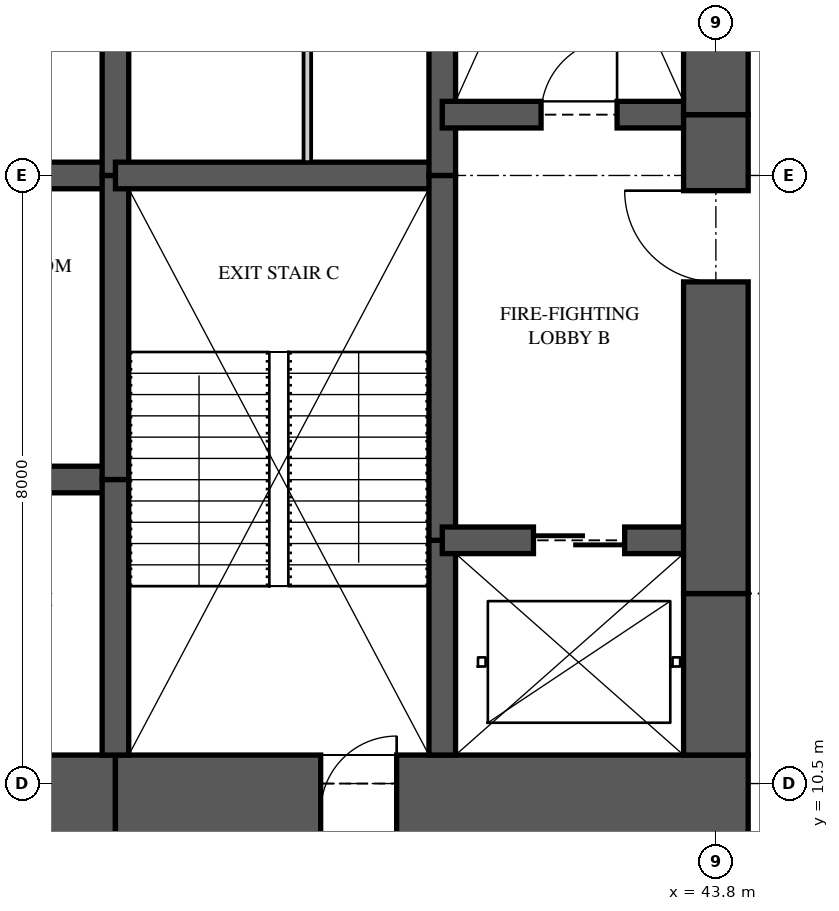
"""IFC4 building model, lengths in metres.
Left out: names, types, materials, properties, quantities, classifications, styles, units other than length and angle.
Written with IfcOpenShell. Run it as: python <this file> out.ifc"""

import sys

from ifc_helpers import new_model, si_unit, direction, frame, frame_2d, origin, place, context, subcontext, project, spatial, rectangle, extrude, element, fill, save


model = new_model("IFC4")
c1 = context("Model", 3, precision=1e-05, world=origin(), true_north=direction((0.0, 1.0)))
c2 = subcontext(c1, "Body", "Model", "MODEL_VIEW")
j1 = project(units=[si_unit("LENGTHUNIT", "METRE"), si_unit("PLANEANGLEUNIT", "RADIAN")], contexts=[c1])
p1 = place(None, origin())
s1 = spatial("IfcSite", under=j1, at=p1, CompositionType="ELEMENT")
p2 = place(p1, origin())
s2 = spatial("IfcBuilding", under=s1, at=p2, CompositionType="ELEMENT")
p3 = place(p2, frame((0.0, 0.0, 118.25)))
s3 = spatial("IfcBuildingStorey", under=s2, at=p3, CompositionType="ELEMENT", Elevation=118.25)
p4 = place(p3, frame((31.6, 10.125, 0.0), z_axis=(0.0, 0.0, 1.0), x_axis=(1.0, 0.0, 0.0)))
e1 = element("IfcWall", 1, at=p4, inside=s3, PredefinedType="SHEAR", context=c2, shape_type="SweptSolid", body=[
    extrude(rectangle(XDim=4.3, YDim=1.5, at=frame_2d((2.15, 0.0))), origin(), (0.0, 0.0, 1.0), 3.35),
])
p5 = place(p3, frame((35.9, 10.125, 0.0), z_axis=(0.0, 0.0, 1.0), x_axis=(1.0, 0.0, 0.0)))
e2 = element("IfcWall", 2, at=p5, inside=s3, PredefinedType="SHEAR", context=c2, shape_type="SweptSolid", body=[
    extrude(rectangle(XDim=8.325, YDim=1.5, at=frame_2d((4.163, 0.0))), origin(), (0.0, 0.0, 1.0), 3.35),
])
p6 = place(p5, frame((2.7, 0.0, 0.0)))
e3 = element("IfcOpeningElement", 3, at=p6, cuts=e2, PredefinedType="OPENING", context=c2, shape_type="SweptSolid", body=[
    extrude(rectangle(XDim=1.0, YDim=2.1, at=frame_2d((0.5, 1.05))), frame((0.0, 0.76, 0.0), z_axis=(0.0, -1.0, 0.0), x_axis=(1.0, 0.0, 0.0)), (0.0, 0.0, 1.0), 1.52),
])
p7 = place(p3, frame((43.8, 10.875, 0.0), z_axis=(0.0, 0.0, 1.0), x_axis=(0.0, 1.0, 0.0)))
e4 = element("IfcWall", 4, at=p7, inside=s3, PredefinedType="SHEAR", context=c2, shape_type="SweptSolid", body=[
    extrude(rectangle(XDim=2.125, YDim=0.85, at=frame_2d((1.062, 0.0))), origin(), (0.0, 0.0, 1.0), 3.35),
])
p8 = place(p3, frame((43.8, 13.0, 0.0), z_axis=(0.0, 0.0, 1.0), x_axis=(0.0, 1.0, 0.0)))
e5 = element("IfcWall", 5, at=p8, inside=s3, PredefinedType="SHEAR", context=c2, shape_type="SweptSolid", body=[
    extrude(rectangle(XDim=6.3, YDim=0.85, at=frame_2d((3.15, 0.0))), origin(), (0.0, 0.0, 1.0), 3.35),
])
p9 = place(p8, frame((4.1, 0.0, 0.0)))
e6 = element("IfcOpeningElement", 6, at=p9, cuts=e5, PredefinedType="OPENING", context=c2, shape_type="SweptSolid", body=[
    extrude(rectangle(XDim=1.2, YDim=2.2, at=frame_2d((0.6, 1.1))), frame((0.0, 0.435, 0.0), z_axis=(0.0, -1.0, 0.0), x_axis=(1.0, 0.0, 0.0)), (0.0, 0.0, 1.0), 0.87),
])
p10 = place(p3, frame((43.8, 19.3, 0.0), z_axis=(0.0, 0.0, 1.0), x_axis=(0.0, 1.0, 0.0)))
e7 = element("IfcWall", 7, at=p10, inside=s3, PredefinedType="SHEAR", context=c2, shape_type="SweptSolid", body=[
    extrude(rectangle(XDim=6.825, YDim=0.85, at=frame_2d((3.413, 0.0))), origin(), (0.0, 0.0, 1.0), 3.35),
])
p11 = place(p3, frame((35.9, 10.875, 0.0), z_axis=(0.0, 0.0, 1.0), x_axis=(0.0, 1.0, 0.0)))
e8 = element("IfcWall", 8, at=p11, inside=s3, PredefinedType="SHEAR", context=c2, shape_type="SweptSolid", body=[
    extrude(rectangle(XDim=3.625, YDim=0.35, at=frame_2d((1.812, 0.0))), origin(), (0.0, 0.0, 1.0), 3.35),
])
for number, where, z_axis, x_axis in (
    (9, (35.9, 14.5, 0.0), (0.0, 0.0, 1.0), (0.0, 1.0, 0.0)),
    (10, (35.9, 18.5, 0.0), (0.0, 0.0, 1.0), (0.0, 1.0, 0.0)),
):
    element("IfcWall", number, at=place(p3, frame(where, z_axis=z_axis, x_axis=x_axis)), inside=s3, PredefinedType="SHEAR", context=c2, shape_type="SweptSolid", body=[
        extrude(rectangle(XDim=4.0, YDim=0.35, at=frame_2d((2.0, 0.0))), origin(), (0.0, 0.0, 1.0), 3.35),
    ])
p12 = place(p3, frame((40.2, 10.875, 0.0), z_axis=(0.0, 0.0, 1.0), x_axis=(0.0, 1.0, 0.0)))
e11 = element("IfcWall", 11, at=p12, inside=s3, PredefinedType="SHEAR", context=c2, shape_type="SweptSolid", body=[
    extrude(rectangle(XDim=2.825, YDim=0.35, at=frame_2d((1.413, 0.0))), origin(), (0.0, 0.0, 1.0), 3.35),
])
p13 = place(p3, frame((40.2, 13.7, 0.0), z_axis=(0.0, 0.0, 1.0), x_axis=(0.0, 1.0, 0.0)))
e12 = element("IfcWall", 12, at=p13, inside=s3, PredefinedType="SHEAR", context=c2, shape_type="SweptSolid", body=[
    extrude(rectangle(XDim=4.8, YDim=0.35, at=frame_2d((2.4, 0.0))), origin(), (0.0, 0.0, 1.0), 3.35),
])
p14 = place(p3, frame((40.2, 18.5, 0.0), z_axis=(0.0, 0.0, 1.0), x_axis=(0.0, 1.0, 0.0)))
e13 = element("IfcWall", 13, at=p14, inside=s3, PredefinedType="SHEAR", context=c2, shape_type="SweptSolid", body=[
    extrude(rectangle(XDim=7.625, YDim=0.35, at=frame_2d((3.812, 0.0))), origin(), (0.0, 0.0, 1.0), 3.35),
])
for number, where, z_axis, x_axis in (
    (14, (31.6, 14.5, 0.0), (0.0, 0.0, 1.0), (1.0, 0.0, 0.0)),
    (15, (31.6, 18.5, 0.0), (0.0, 0.0, 1.0), (1.0, 0.0, 0.0)),
):
    element("IfcWall", number, at=place(p3, frame(where, z_axis=z_axis, x_axis=x_axis)), inside=s3, PredefinedType="SHEAR", context=c2, shape_type="SweptSolid", body=[
        extrude(rectangle(XDim=4.3, YDim=0.35, at=frame_2d((2.15, 0.0))), origin(), (0.0, 0.0, 1.0), 3.35),
    ])
p15 = place(p3, frame((35.9, 18.5, 0.0), z_axis=(0.0, 0.0, 1.0), x_axis=(1.0, 0.0, 0.0)))
e16 = element("IfcWall", 16, at=p15, inside=s3, PredefinedType="SHEAR", context=c2, shape_type="SweptSolid", body=[
    extrude(rectangle(XDim=4.3, YDim=0.35, at=frame_2d((2.15, 0.0))), origin(), (0.0, 0.0, 1.0), 3.35),
])
p16 = place(p3, frame((40.2, 13.7, 0.0), z_axis=(0.0, 0.0, 1.0), x_axis=(1.0, 0.0, 0.0)))
e17 = element("IfcWall", 17, at=p16, inside=s3, PredefinedType="SHEAR", context=c2, shape_type="SweptSolid", body=[
    extrude(rectangle(XDim=3.6, YDim=0.35, at=frame_2d((1.8, 0.0))), origin(), (0.0, 0.0, 1.0), 3.35),
])
p17 = place(p16, frame((1.2, 0.0, 0.0)))
e18 = element("IfcOpeningElement", 18, at=p17, cuts=e17, PredefinedType="OPENING", context=c2, shape_type="SweptSolid", body=[
    extrude(rectangle(XDim=1.2, YDim=2.1, at=frame_2d((0.6, 1.05))), frame((0.0, 0.185, 0.0), z_axis=(0.0, -1.0, 0.0), x_axis=(1.0, 0.0, 0.0)), (0.0, 0.0, 1.0), 0.37),
])
p18 = place(p3, frame((40.2, 19.3, 0.0), z_axis=(0.0, 0.0, 1.0), x_axis=(1.0, 0.0, 0.0)))
e19 = element("IfcWall", 19, at=p18, inside=s3, PredefinedType="SHEAR", context=c2, shape_type="SweptSolid", body=[
    extrude(rectangle(XDim=3.6, YDim=0.35, at=frame_2d((1.8, 0.0))), origin(), (0.0, 0.0, 1.0), 3.35),
])
p19 = place(p18, frame((1.3, 0.0, 0.0)))
e20 = element("IfcOpeningElement", 20, at=p19, cuts=e19, PredefinedType="OPENING", context=c2, shape_type="SweptSolid", body=[
    extrude(rectangle(XDim=1.0, YDim=2.1, at=frame_2d((0.5, 1.05))), frame((0.0, 0.185, 0.0), z_axis=(0.0, -1.0, 0.0), x_axis=(1.0, 0.0, 0.0)), (0.0, 0.0, 1.0), 0.37),
])
p20 = place(p3, frame((38.425, 18.675, 0.0), z_axis=(0.0, 0.0, 1.0), x_axis=(0.0, 1.0, 0.0)))
e21 = element("IfcWall", 21, at=p20, inside=s3, PredefinedType="PARTITIONING", context=c2, shape_type="SweptSolid", body=[
    extrude(rectangle(XDim=5.6, YDim=0.1, at=frame_2d((2.8, 0.0))), origin(), (0.0, 0.0, 1.0), 3.11),
])
p21 = place(p19, origin())
e22 = element("IfcDoor", 22, at=p21, inside=s3, OperationType="SINGLE_SWING_RIGHT", PredefinedType="DOOR", context=c2, shape_type="SweptSolid", body=[
    extrude(rectangle(XDim=1.0, YDim=2.1, at=frame_2d((0.5, 1.05))), frame((0.0, 0.025, 0.0), z_axis=(0.0, -1.0, 0.0), x_axis=(1.0, 0.0, 0.0)), (0.0, 0.0, 1.0), 0.05),
])
fill(e20, e22)
p22 = place(p9, origin())
e23 = element("IfcDoor", 23, at=p22, inside=s3, OperationType="SINGLE_SWING_RIGHT", PredefinedType="DOOR", context=c2, shape_type="SweptSolid", body=[
    extrude(rectangle(XDim=1.2, YDim=2.2, at=frame_2d((0.6, 1.1))), frame((0.0, 0.025, 0.0), z_axis=(0.0, -1.0, 0.0), x_axis=(1.0, 0.0, 0.0)), (0.0, 0.0, 1.0), 0.05),
])
fill(e6, e23)
p23 = place(p17, origin())
e24 = element("IfcDoor", 24, at=p23, inside=s3, OperationType="SLIDING_TO_LEFT", PredefinedType="DOOR", context=c2, shape_type="SweptSolid", body=[
    extrude(rectangle(XDim=1.2, YDim=2.1, at=frame_2d((0.6, 1.05))), frame((0.0, 0.025, 0.0), z_axis=(0.0, -1.0, 0.0), x_axis=(1.0, 0.0, 0.0)), (0.0, 0.0, 1.0), 0.05),
])
fill(e18, e24)
p24 = place(p6, origin())
e25 = element("IfcDoor", 25, at=p24, inside=s3, OperationType="SINGLE_SWING_RIGHT", PredefinedType="DOOR", context=c2, shape_type="SweptSolid", body=[
    extrude(rectangle(XDim=1.0, YDim=2.1, at=frame_2d((0.5, 1.05))), frame((0.0, 0.025, 0.0), z_axis=(0.0, -1.0, 0.0), x_axis=(1.0, 0.0, 0.0)), (0.0, 0.0, 1.0), 0.05),
])
fill(e3, e25)
save(model, sys.argv[1])
